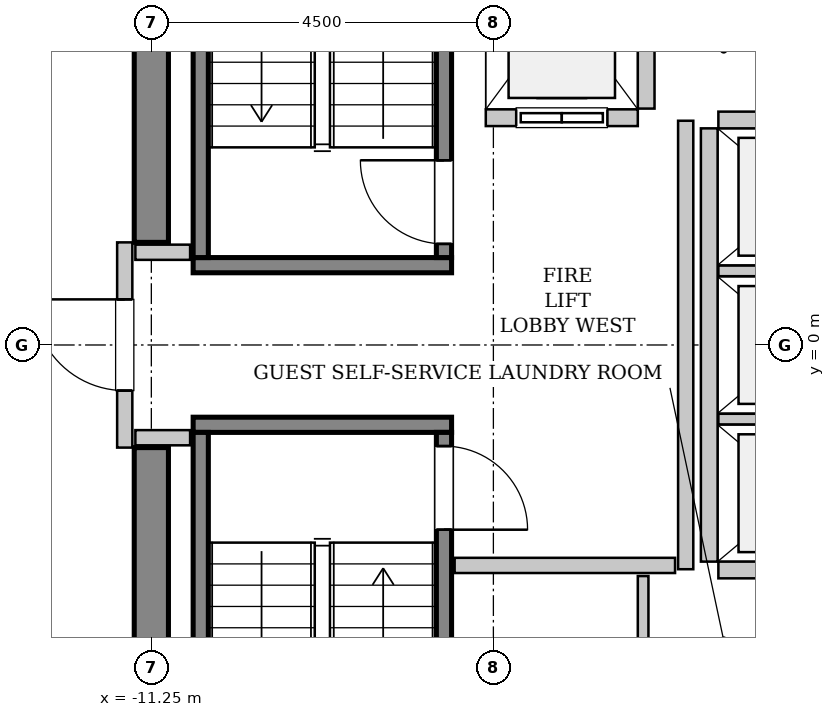
"""IFC4 building model, lengths in metres.
Left out: names, types, materials, properties, quantities, classifications, styles, units other than length and angle.
Written with IfcOpenShell. Run it as: python <this file> out.ifc"""

import sys

from ifc_helpers import new_model, si_unit, direction, frame, frame_2d, origin, place, context, subcontext, project, spatial, rectangle, extrude, source, transform, mapped, element, fill, save


model = new_model("IFC4")
c1 = context("Model", 3, precision=1e-05, world=origin(), true_north=direction((0.0, 1.0)))
c2 = subcontext(c1, "Body", "Model", "MODEL_VIEW")
j1 = project(units=[si_unit("LENGTHUNIT", "METRE"), si_unit("PLANEANGLEUNIT", "RADIAN")], contexts=[c1])
p1 = place(None, origin())
s1 = spatial("IfcSite", under=j1, at=p1, CompositionType="ELEMENT")
p2 = place(p1, origin())
s2 = spatial("IfcBuilding", under=s1, at=p2, CompositionType="ELEMENT")
p3 = place(p2, frame((0.0, 0.0, 310.2)))
s3 = spatial("IfcBuildingStorey", under=s2, at=p3, CompositionType="ELEMENT", Elevation=310.2)
m1 = source(origin(), c2, "Body", "SweptSolid", [
    extrude(rectangle(XDim=7.425, YDim=0.45, at=frame_2d((3.712, 0.0))), origin(), (0.0, 0.0, 1.0), 3.8),
])
for number, where, z_axis, x_axis in (
    (1, (-11.25, -8.775, 0.0), (0.0, 0.0, 1.0), (0.0, 1.0, 0.0)),
    (2, (-11.25, 1.35, 0.0), (0.0, 0.0, 1.0), (0.0, 1.0, 0.0)),
):
    element("IfcWall", number, at=place(p3, frame(where, z_axis=z_axis, x_axis=x_axis)), inside=s3, PredefinedType="SHEAR", context=c2, shape_type="MappedRepresentation", body=[
        mapped(m1, transform((0.0, 0.0, 0.0), x_axis=(1.0, 0.0, 0.0), y_axis=(0.0, 1.0, 0.0), z_axis=(0.0, 0.0, 1.0), scale=1.0)),
    ])
m2 = source(origin(), c2, "Body", "SweptSolid", [
    extrude(rectangle(XDim=3.4, YDim=0.2, at=frame_2d((1.7, 0.0))), origin(), (0.0, 0.0, 1.0), 3.8),
])
p4 = place(p3, frame((-7.3, 1.05, 0.0), z_axis=(0.0, 0.0, 1.0), x_axis=(-1.0, 0.0, 0.0)))
e3 = element("IfcWall", 3, at=p4, inside=s3, PredefinedType="SOLIDWALL", context=c2, shape_type="MappedRepresentation", body=[
    mapped(m2, transform((0.0, 0.0, 0.0), x_axis=(1.0, 0.0, 0.0), y_axis=(0.0, 1.0, 0.0), z_axis=(0.0, 0.0, 1.0), scale=1.0)),
])
m3 = source(origin(), c2, "Body", "SweptSolid", [
    extrude(rectangle(XDim=7.1, YDim=0.2, at=frame_2d((3.55, 0.0))), origin(), (0.0, 0.0, 1.0), 3.8),
])
p5 = place(p3, frame((-7.4, 1.15, 0.0), z_axis=(0.0, 0.0, 1.0), x_axis=(0.0, 1.0, 0.0)))
e4 = element("IfcWall", 4, at=p5, inside=s3, PredefinedType="SOLIDWALL", context=c2, shape_type="MappedRepresentation", body=[
    mapped(m3, transform((0.0, 0.0, 0.0), x_axis=(1.0, 0.0, 0.0), y_axis=(0.0, 1.0, 0.0), z_axis=(0.0, 0.0, 1.0), scale=1.0)),
])
p6 = place(p5, frame((0.18, 0.0, 0.0)))
e5 = element("IfcOpeningElement", 5, at=p6, cuts=e4, PredefinedType="OPENING", context=c2, shape_type="SweptSolid", body=[
    extrude(rectangle(XDim=1.1, YDim=2.15, at=frame_2d((0.55, 1.075))), frame((0.0, 0.11, 0.0), z_axis=(0.0, -1.0, 0.0), x_axis=(1.0, 0.0, 0.0)), (0.0, 0.0, 1.0), 0.22),
])
p7 = place(p3, frame((-10.6, 1.15, 0.0), z_axis=(0.0, 0.0, 1.0), x_axis=(0.0, 1.0, 0.0)))
e6 = element("IfcWall", 6, at=p7, inside=s3, PredefinedType="SOLIDWALL", context=c2, shape_type="MappedRepresentation", body=[
    mapped(m3, transform((0.0, 0.0, 0.0), x_axis=(1.0, 0.0, 0.0), y_axis=(0.0, 1.0, 0.0), z_axis=(0.0, 0.0, 1.0), scale=1.0)),
])
p8 = place(p3, frame((-10.7, -1.05, 0.0), z_axis=(0.0, 0.0, 1.0), x_axis=(1.0, 0.0, 0.0)))
e7 = element("IfcWall", 7, at=p8, inside=s3, PredefinedType="SOLIDWALL", context=c2, shape_type="MappedRepresentation", body=[
    mapped(m2, transform((0.0, 0.0, 0.0), x_axis=(1.0, 0.0, 0.0), y_axis=(0.0, 1.0, 0.0), z_axis=(0.0, 0.0, 1.0), scale=1.0)),
])
p9 = place(p3, frame((-10.6, -1.15, 0.0), z_axis=(0.0, 0.0, 1.0), x_axis=(0.0, -1.0, 0.0)))
e8 = element("IfcWall", 8, at=p9, inside=s3, PredefinedType="SOLIDWALL", context=c2, shape_type="MappedRepresentation", body=[
    mapped(m3, transform((0.0, 0.0, 0.0), x_axis=(1.0, 0.0, 0.0), y_axis=(0.0, 1.0, 0.0), z_axis=(0.0, 0.0, 1.0), scale=1.0)),
])
p10 = place(p3, frame((-7.4, -1.15, 0.0), z_axis=(0.0, 0.0, 1.0), x_axis=(0.0, -1.0, 0.0)))
e9 = element("IfcWall", 9, at=p10, inside=s3, PredefinedType="SOLIDWALL", context=c2, shape_type="MappedRepresentation", body=[
    mapped(m3, transform((0.0, 0.0, 0.0), x_axis=(1.0, 0.0, 0.0), y_axis=(0.0, 1.0, 0.0), z_axis=(0.0, 0.0, 1.0), scale=1.0)),
])
p11 = place(p10, frame((0.18, 0.0, 0.0)))
e10 = element("IfcOpeningElement", 10, at=p11, cuts=e9, PredefinedType="OPENING", context=c2, shape_type="SweptSolid", body=[
    extrude(rectangle(XDim=1.1, YDim=2.15, at=frame_2d((0.55, 1.075))), frame((0.0, 0.11, 0.0), z_axis=(0.0, -1.0, 0.0), x_axis=(1.0, 0.0, 0.0)), (0.0, 0.0, 1.0), 0.22),
])
m4 = source(origin(), c2, "Body", "SweptSolid", [
    extrude(rectangle(XDim=2.0, YDim=0.22, at=frame_2d((1.0, 0.0))), origin(), (0.0, 0.0, 1.0), 3.535),
])
p12 = place(p3, frame((-6.85, 2.99, 0.0), z_axis=(0.0, 0.0, 1.0), x_axis=(1.0, 0.0, 0.0)))
e11 = element("IfcWall", 11, at=p12, inside=s3, PredefinedType="SOLIDWALL", context=c2, shape_type="MappedRepresentation", body=[
    mapped(m4, transform((0.0, 0.0, 0.0), x_axis=(1.0, 0.0, 0.0), y_axis=(0.0, 1.0, 0.0), z_axis=(0.0, 0.0, 1.0), scale=1.0)),
])
p13 = place(p12, frame((0.4, 0.0, 0.0)))
e12 = element("IfcOpeningElement", 12, at=p13, cuts=e11, PredefinedType="OPENING", context=c2, shape_type="SweptSolid", body=[
    extrude(rectangle(XDim=1.2, YDim=2.2, at=frame_2d((0.6, 1.1))), frame((0.0, 0.12, 0.0), z_axis=(0.0, -1.0, 0.0), x_axis=(1.0, 0.0, 0.0)), (0.0, 0.0, 1.0), 0.24),
])
m5 = source(origin(), c2, "Body", "SweptSolid", [
    extrude(rectangle(XDim=2.68, YDim=0.22, at=frame_2d((1.34, 0.0))), origin(), (0.0, 0.0, 1.0), 3.535),
])
p14 = place(p3, frame((-4.74, 3.11, 0.0), z_axis=(0.0, 0.0, 1.0), x_axis=(0.0, 1.0, 0.0)))
e13 = element("IfcWall", 13, at=p14, inside=s3, PredefinedType="SOLIDWALL", context=c2, shape_type="MappedRepresentation", body=[
    mapped(m5, transform((0.0, 0.0, 0.0), x_axis=(1.0, 0.0, 0.0), y_axis=(0.0, 1.0, 0.0), z_axis=(0.0, 0.0, 1.0), scale=1.0)),
])
m6 = source(origin(), c2, "Body", "SweptSolid", [
    extrude(rectangle(XDim=5.7, YDim=0.22, at=frame_2d((2.85, 0.0))), origin(), (0.0, 0.0, 1.0), 3.535),
])
p15 = place(p3, frame((-3.91, 2.85, 0.0), z_axis=(0.0, 0.0, 1.0), x_axis=(0.0, -1.0, 0.0)))
e14 = element("IfcWall", 14, at=p15, inside=s3, PredefinedType="SOLIDWALL", context=c2, shape_type="MappedRepresentation", body=[
    mapped(m6, transform((0.0, 0.0, 0.0), x_axis=(1.0, 0.0, 0.0), y_axis=(0.0, 1.0, 0.0), z_axis=(0.0, 0.0, 1.0), scale=1.0)),
])
m7 = source(origin(), c2, "Body", "SweptSolid", [
    extrude(rectangle(XDim=2.13, YDim=0.22, at=frame_2d((1.065, 0.0))), origin(), (0.0, 0.0, 1.0), 3.535),
])
p16 = place(p3, frame((-3.79, -2.96, 0.0), z_axis=(0.0, 0.0, 1.0), x_axis=(1.0, 0.0, 0.0)))
e15 = element("IfcWall", 15, at=p16, inside=s3, PredefinedType="SOLIDWALL", context=c2, shape_type="MappedRepresentation", body=[
    mapped(m7, transform((0.0, 0.0, 0.0), x_axis=(1.0, 0.0, 0.0), y_axis=(0.0, 1.0, 0.0), z_axis=(0.0, 0.0, 1.0), scale=1.0)),
])
m8 = source(origin(), c2, "Body", "SweptSolid", [
    extrude(rectangle(XDim=2.13, YDim=0.14, at=frame_2d((1.065, 0.0))), origin(), (0.0, 0.0, 1.0), 3.535),
])
for number, where, z_axis, x_axis in (
    (16, (-3.79, -0.975, 0.0), (0.0, 0.0, 1.0), (1.0, 0.0, 0.0)),
    (17, (-3.79, 0.975, 0.0), (0.0, 0.0, 1.0), (1.0, 0.0, 0.0)),
):
    element("IfcWall", number, at=place(p3, frame(where, z_axis=z_axis, x_axis=x_axis)), inside=s3, PredefinedType="PARTITIONING", context=c2, shape_type="MappedRepresentation", body=[
        mapped(m8, transform((0.0, 0.0, 0.0), x_axis=(1.0, 0.0, 0.0), y_axis=(0.0, 1.0, 0.0), z_axis=(0.0, 0.0, 1.0), scale=1.0)),
    ])
p17 = place(p3, frame((-1.66, 2.96, 0.0), z_axis=(0.0, 0.0, 1.0), x_axis=(-1.0, 0.0, 0.0)))
e18 = element("IfcWall", 18, at=p17, inside=s3, PredefinedType="SOLIDWALL", context=c2, shape_type="MappedRepresentation", body=[
    mapped(m7, transform((0.0, 0.0, 0.0), x_axis=(1.0, 0.0, 0.0), y_axis=(0.0, 1.0, 0.0), z_axis=(0.0, 0.0, 1.0), scale=1.0)),
])
m9 = source(origin(), c2, "Body", "SweptSolid", [
    extrude(rectangle(XDim=2.7, YDim=0.2, at=frame_2d((1.35, 0.0))), origin(), (0.0, 0.0, 1.0), 2.625),
])
p18 = place(p3, frame((-11.6, -1.35, 0.0), z_axis=(0.0, 0.0, 1.0), x_axis=(0.0, 1.0, 0.0)))
e19 = element("IfcWall", 19, at=p18, inside=s3, PredefinedType="PARTITIONING", context=c2, shape_type="MappedRepresentation", body=[
    mapped(m9, transform((0.0, 0.0, 0.0), x_axis=(1.0, 0.0, 0.0), y_axis=(0.0, 1.0, 0.0), z_axis=(0.0, 0.0, 1.0), scale=1.0)),
])
p19 = place(p18, frame((0.75, 0.0, 0.0)))
e20 = element("IfcOpeningElement", 20, at=p19, cuts=e19, PredefinedType="OPENING", context=c2, shape_type="SweptSolid", body=[
    extrude(rectangle(XDim=1.2, YDim=2.15, at=frame_2d((0.6, 1.075))), frame((0.0, 0.11, 0.0), z_axis=(0.0, -1.0, 0.0), x_axis=(1.0, 0.0, 0.0)), (0.0, 0.0, 1.0), 0.22),
])
m10 = source(origin(), c2, "Body", "SweptSolid", [
    extrude(rectangle(XDim=5.9, YDim=0.2, at=frame_2d((2.95, 0.0))), origin(), (0.0, 0.0, 1.0), 3.535),
])
p20 = place(p3, frame((-4.22, -2.95, 0.0), z_axis=(0.0, 0.0, 1.0), x_axis=(0.0, 1.0, 0.0)))
e21 = element("IfcWall", 21, at=p20, inside=s3, PredefinedType="PARTITIONING", context=c2, shape_type="MappedRepresentation", body=[
    mapped(m10, transform((0.0, 0.0, 0.0), x_axis=(1.0, 0.0, 0.0), y_axis=(0.0, 1.0, 0.0), z_axis=(0.0, 0.0, 1.0), scale=1.0)),
])
m11 = source(origin(), c2, "Body", "SweptSolid", [
    extrude(rectangle(XDim=2.9, YDim=0.2, at=frame_2d((1.45, 0.0))), origin(), (0.0, 0.0, 1.0), 3.535),
])
p21 = place(p3, frame((-7.26, -2.9, 0.0), z_axis=(0.0, 0.0, 1.0), x_axis=(1.0, 0.0, 0.0)))
e22 = element("IfcWall", 22, at=p21, inside=s3, PredefinedType="PARTITIONING", context=c2, shape_type="MappedRepresentation", body=[
    mapped(m11, transform((0.0, 0.0, 0.0), x_axis=(1.0, 0.0, 0.0), y_axis=(0.0, 1.0, 0.0), z_axis=(0.0, 0.0, 1.0), scale=1.0)),
])
m12 = source(origin(), c2, "Body", "SweptSolid", [
    extrude(rectangle(XDim=0.72, YDim=0.2, at=frame_2d((0.36, 0.0))), origin(), (0.0, 0.0, 1.0), 3.535),
])
for number, where, z_axis, x_axis in (
    (23, (-11.46, 1.22, 0.0), (0.0, 0.0, 1.0), (1.0, 0.0, 0.0)),
    (24, (-11.46, -1.22, 0.0), (0.0, 0.0, 1.0), (1.0, 0.0, 0.0)),
):
    element("IfcWall", number, at=place(p3, frame(where, z_axis=z_axis, x_axis=x_axis)), inside=s3, PredefinedType="PARTITIONING", context=c2, shape_type="MappedRepresentation", body=[
        mapped(m12, transform((0.0, 0.0, 0.0), x_axis=(1.0, 0.0, 0.0), y_axis=(0.0, 1.0, 0.0), z_axis=(0.0, 0.0, 1.0), scale=1.0)),
    ])
m13 = source(origin(), c2, "Body", "SweptSolid", [
    extrude(rectangle(XDim=1.6, YDim=0.14, at=frame_2d((0.8, 0.0))), origin(), (0.0, 0.0, 1.0), 3.535),
])
p22 = place(p3, frame((-4.78, -4.64, 0.0), z_axis=(0.0, 0.0, 1.0), x_axis=(0.0, 1.0, 0.0)))
e25 = element("IfcWall", 25, at=p22, inside=s3, PredefinedType="PARTITIONING", context=c2, shape_type="MappedRepresentation", body=[
    mapped(m13, transform((0.0, 0.0, 0.0), x_axis=(1.0, 0.0, 0.0), y_axis=(0.0, 1.0, 0.0), z_axis=(0.0, 0.0, 1.0), scale=1.0)),
])
m14 = source(origin(), c2, "Body", "SweptSolid", [
    extrude(rectangle(XDim=1.1, YDim=2.15, at=frame_2d((0.55, 1.075))), frame((0.0, 0.025, 0.0), z_axis=(0.0, -1.0, 0.0), x_axis=(1.0, 0.0, 0.0)), (0.0, 0.0, 1.0), 0.05),
])
p23 = place(p6, origin())
e26 = element("IfcDoor", 26, at=p23, inside=s3, OperationType="SINGLE_SWING_RIGHT", PredefinedType="DOOR", context=c2, shape_type="MappedRepresentation", body=[
    mapped(m14, transform((0.0, 0.0, 0.0), x_axis=(1.0, 0.0, 0.0), y_axis=(0.0, 1.0, 0.0), z_axis=(0.0, 0.0, 1.0), scale=1.0)),
])
fill(e5, e26)
p24 = place(p11, origin())
e27 = element("IfcDoor", 27, at=p24, inside=s3, OperationType="SINGLE_SWING_RIGHT", PredefinedType="DOOR", context=c2, shape_type="MappedRepresentation", body=[
    mapped(m14, transform((0.0, 0.0, 0.0), x_axis=(1.0, 0.0, 0.0), y_axis=(0.0, 1.0, 0.0), z_axis=(0.0, 0.0, 1.0), scale=1.0)),
])
fill(e10, e27)
m15 = source(origin(), c2, "Body", "SweptSolid", [
    extrude(rectangle(XDim=1.2, YDim=2.2, at=frame_2d((0.6, 1.1))), frame((0.0, 0.025, 0.0), z_axis=(0.0, -1.0, 0.0), x_axis=(1.0, 0.0, 0.0)), (0.0, 0.0, 1.0), 0.05),
])
p25 = place(p13, origin())
e28 = element("IfcDoor", 28, at=p25, inside=s3, OperationType="SLIDING_TO_LEFT", PredefinedType="DOOR", context=c2, shape_type="MappedRepresentation", body=[
    mapped(m15, transform((0.0, 0.0, 0.0), x_axis=(1.0, 0.0, 0.0), y_axis=(0.0, 1.0, 0.0), z_axis=(0.0, 0.0, 1.0), scale=1.0)),
])
fill(e12, e28)
m16 = source(origin(), c2, "Body", "SweptSolid", [
    extrude(rectangle(XDim=1.2, YDim=2.15, at=frame_2d((0.6, 1.075))), frame((0.0, 0.025, 0.0), z_axis=(0.0, -1.0, 0.0), x_axis=(1.0, 0.0, 0.0)), (0.0, 0.0, 1.0), 0.05),
])
p26 = place(p19, origin())
e29 = element("IfcDoor", 29, at=p26, inside=s3, OperationType="SINGLE_SWING_RIGHT", PredefinedType="DOOR", context=c2, shape_type="MappedRepresentation", body=[
    mapped(m16, transform((0.0, 0.0, 0.0), x_axis=(1.0, 0.0, 0.0), y_axis=(0.0, 1.0, 0.0), z_axis=(0.0, 0.0, 1.0), scale=1.0)),
])
fill(e20, e29)
save(model, sys.argv[1])
